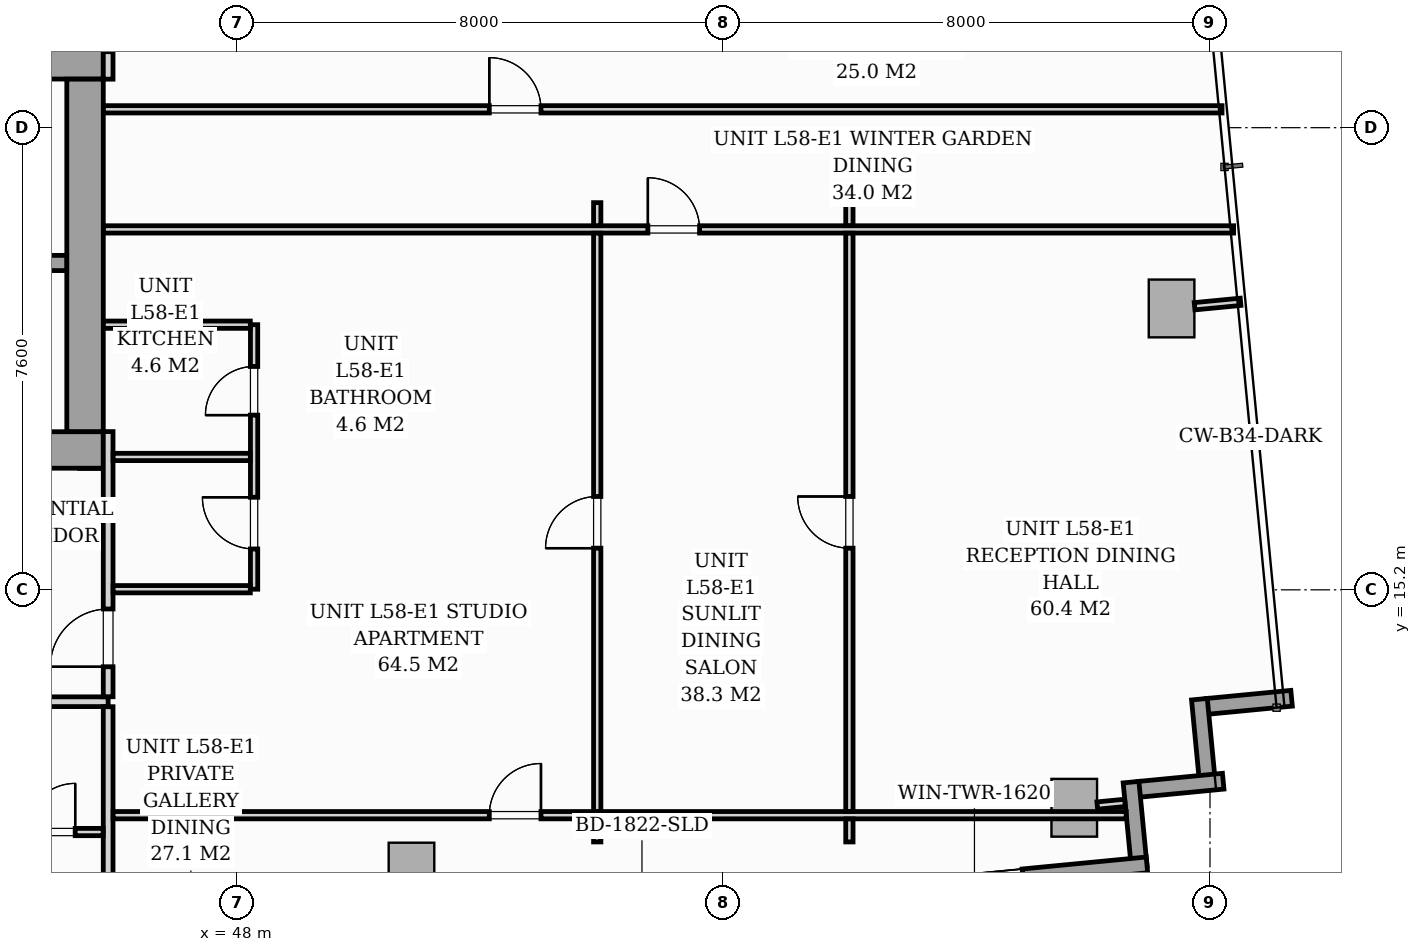
"""IFC4 building model, lengths in metres.
Left out: names, types, materials, properties, quantities, classifications, styles, units other than length and angle.
Written with IfcOpenShell. Run it as: python <this file> out.ifc"""

import sys

from ifc_helpers import new_model, si_unit, direction, frame, frame_2d, origin, origin_2d, place, context, subcontext, project, spatial, rectangle, i_section, extrude, source, transform, mapped, element, fill, save


model = new_model("IFC4")
c1 = context("Model", 3, precision=1e-05, world=origin(), true_north=direction((0.0, 1.0)))
c2 = subcontext(c1, "Body", "Model", "MODEL_VIEW")
j1 = project(units=[si_unit("LENGTHUNIT", "METRE"), si_unit("PLANEANGLEUNIT", "RADIAN")], contexts=[c1])
p1 = place(None, origin())
s1 = spatial("IfcSite", under=j1, at=p1, CompositionType="ELEMENT")
p2 = place(p1, origin())
s2 = spatial("IfcBuilding", under=s1, at=p2, CompositionType="ELEMENT")
p3 = place(p2, frame((0.0, 0.0, 201.8)))
s3 = spatial("IfcBuildingStorey", under=s2, at=p3, CompositionType="ELEMENT", Elevation=201.8)
m1 = source(origin(), c2, "Body", "SweptSolid", [
    extrude(i_section(OverallWidth=0.416, OverallDepth=0.446, WebThickness=0.039, FlangeThickness=0.063, FilletRadius=0.018, at=origin_2d()), origin(), (0.0, 0.0, 1.0), 3.196),
])
for number, where, z_axis, x_axis in (
    (1, (45.6, 17.4, 0.002), (0.0, 0.0, 1.0), (1.0, 0.0, 0.0)),
    (2, (45.6, 24.0, 0.002), (0.0, 0.0, 1.0), (1.0, 0.0, 0.0)),
):
    element("IfcColumn", number, at=place(p3, frame(where, z_axis=z_axis, x_axis=x_axis)), inside=s3, PredefinedType="PILASTER", context=c2, shape_type="MappedRepresentation", body=[
        mapped(m1, transform((0.0, 0.0, 0.0), scale=1.0)),
    ])
m2 = source(origin(), c2, "Body", "SweptSolid", [
    extrude(rectangle(XDim=0.75, YDim=0.95, at=origin_2d()), origin(), (0.0, 0.0, 1.0), 3.196),
])
for number, where, z_axis, x_axis in (
    (3, (50.868, 10.566, 0.002), (0.0, 0.0, 1.0), (0.995, 0.096, 0.0)),
    (4, (61.768, 11.616, 0.002), (0.0, 0.0, 1.0), (0.995, 0.096, 0.0)),
    (5, (63.368, 19.827, 0.002), (0.0, 0.0, 1.0), (0.995, 0.096, 0.0)),
):
    element("IfcColumn", number, at=place(p3, frame(where, z_axis=z_axis, x_axis=x_axis)), inside=s3, PredefinedType="COLUMN", context=c2, shape_type="MappedRepresentation", body=[
        mapped(m2, transform((0.0, 0.0, 0.0), scale=1.0)),
    ])
p4 = place(p3, frame((65.342, 13.417, 0.0), z_axis=(0.0, 0.0, 1.0), x_axis=(-0.99540774648, -0.095725744959, 0.0)))
e6 = element("IfcWall", 6, at=p4, inside=s3, PredefinedType="STANDARD", context=c2, shape_type="SweptSolid", body=[
    extrude(rectangle(XDim=1.395, YDim=0.26, at=frame_2d((0.698, 0.0))), origin(), (0.0, 0.0, 1.0), 2.94),
])
p5 = place(p3, frame((63.826, 13.401, 0.0), z_axis=(0.0, 0.0, 1.0), x_axis=(0.095915846097, -0.995389446633, 0.0)))
e7 = element("IfcWall", 7, at=p5, inside=s3, PredefinedType="STANDARD", context=c2, shape_type="SweptSolid", body=[
    extrude(rectangle(XDim=1.395, YDim=0.26, at=frame_2d((0.697, 0.0))), origin(), (0.0, 0.0, 1.0), 2.94),
])
for number, where, z_axis, x_axis in (
    (8, (64.217, 12.053, 0.0), (0.0, 0.0, 1.0), (-0.995, -0.096, 0.0)),
    (9, (62.702, 12.037, 0.0), (0.0, 0.0, 1.0), (0.096, -0.995, 0.0)),
):
    element("IfcWall", number, at=place(p3, frame(where, z_axis=z_axis, x_axis=x_axis)), inside=s3, PredefinedType="STANDARD", context=c2, shape_type="SweptSolid", body=[
        extrude(rectangle(XDim=1.395, YDim=0.26, at=frame_2d((0.698, 0.0))), origin(), (0.0, 0.0, 1.0), 2.94),
    ])
p6 = place(p3, frame((62.963, 10.676, 0.0), z_axis=(0.0, 0.0, 1.0), x_axis=(-0.995395627913, -0.095851676732, 0.0)))
e10 = element("IfcWall", 10, at=p6, inside=s3, PredefinedType="STANDARD", context=c2, shape_type="SweptSolid", body=[
    extrude(rectangle(XDim=16.1, YDim=0.26, at=frame_2d((8.05, 0.0))), origin(), (0.0, 0.0, 1.0), 2.94),
])
p7 = place(p6, frame((7.443, 0.0, 0.0)))
e11 = element("IfcOpeningElement", 11, at=p7, cuts=e10, PredefinedType="OPENING", context=c2, shape_type="SweptSolid", body=[
    extrude(rectangle(XDim=1.8, YDim=2.06, at=frame_2d((0.9, 1.03))), frame((0.0, 0.14, 0.0), z_axis=(0.0, -1.0, 0.0), x_axis=(1.0, 0.0, 0.0)), (0.0, 0.0, 1.0), 0.28),
])
p8 = place(p6, frame((2.05, 0.0, 0.65)))
e12 = element("IfcOpeningElement", 12, at=p8, cuts=e10, PredefinedType="OPENING", context=c2, shape_type="SweptSolid", body=[
    extrude(rectangle(XDim=1.6, YDim=1.5, at=frame_2d((0.8, 0.75))), frame((0.0, 0.14, 0.0), z_axis=(0.0, -1.0, 0.0), x_axis=(1.0, 0.0, 0.0)), (0.0, 0.0, 1.0), 0.28),
])
p9 = place(p3, frame((26.2, 17.5, 0.0), z_axis=(0.0, 0.0, 1.0), x_axis=(1.0, 0.0, 0.0)))
e13 = element("IfcWall", 13, at=p9, inside=s3, PredefinedType="SHEAR", context=c2, shape_type="SweptSolid", body=[
    extrude(rectangle(XDim=19.6, YDim=0.6, at=frame_2d((9.8, 0.0))), origin(), (0.0, 0.0, 1.0), 3.2),
])
p10 = place(p9, frame((0.95, 0.0, 0.0)))
e14 = element("IfcOpeningElement", 14, at=p10, cuts=e13, PredefinedType="OPENING", context=c2, shape_type="SweptSolid", body=[
    extrude(rectangle(XDim=0.95, YDim=2.06, at=frame_2d((0.475, 1.03))), frame((0.0, 0.31, 0.0), z_axis=(0.0, -1.0, 0.0), x_axis=(1.0, 0.0, 0.0)), (0.0, 0.0, 1.0), 0.62),
])
p11 = place(p9, frame((9.38, 0.0, 0.0)))
e15 = element("IfcOpeningElement", 15, at=p11, cuts=e13, PredefinedType="OPENING", context=c2, shape_type="SweptSolid", body=[
    extrude(rectangle(XDim=0.85, YDim=2.0, at=frame_2d((0.425, 1.0))), frame((0.0, 0.31, 0.0), z_axis=(0.0, -1.0, 0.0), x_axis=(1.0, 0.0, 0.0)), (0.0, 0.0, 1.0), 0.62),
])
p12 = place(p9, frame((17.55, 0.0, 0.0)))
e16 = element("IfcOpeningElement", 16, at=p12, cuts=e13, PredefinedType="OPENING", context=c2, shape_type="SweptSolid", body=[
    extrude(rectangle(XDim=0.95, YDim=2.06, at=frame_2d((0.475, 1.03))), frame((0.0, 0.31, 0.0), z_axis=(0.0, -1.0, 0.0), x_axis=(1.0, 0.0, 0.0)), (0.0, 0.0, 1.0), 0.62),
])
p13 = place(p3, frame((26.2, 23.9, 0.0), z_axis=(0.0, 0.0, 1.0), x_axis=(1.0, 0.0, 0.0)))
e17 = element("IfcWall", 17, at=p13, inside=s3, PredefinedType="SHEAR", context=c2, shape_type="SweptSolid", body=[
    extrude(rectangle(XDim=19.6, YDim=0.6, at=frame_2d((9.8, 0.0))), origin(), (0.0, 0.0, 1.0), 3.2),
])
p14 = place(p3, frame((45.5, 17.802, 0.0), z_axis=(0.0, 0.0, 1.0), x_axis=(0.0, 1.0, 0.0)))
e18 = element("IfcWall", 18, at=p14, inside=s3, PredefinedType="SHEAR", context=c2, shape_type="SweptSolid", body=[
    extrude(rectangle(XDim=5.796, YDim=0.6, at=frame_2d((2.898, 0.0))), origin(), (0.0, 0.0, 1.0), 3.2),
])
p15 = place(p3, frame((37.05, 20.575, 0.0), z_axis=(0.0, 0.0, 1.0), x_axis=(1.0, 0.0, 0.0)))
e19 = element("IfcWall", 19, at=p15, inside=s3, PredefinedType="SOLIDWALL", context=c2, shape_type="SweptSolid", body=[
    extrude(rectangle(XDim=8.148, YDim=0.25, at=frame_2d((4.074, 0.0))), origin(), (0.0, 0.0, 1.0), 3.2),
])
p16 = place(p15, frame((6.6, 0.0, 0.0)))
e20 = element("IfcOpeningElement", 20, at=p16, cuts=e19, PredefinedType="OPENING", context=c2, shape_type="SweptSolid", body=[
    extrude(rectangle(XDim=0.95, YDim=2.06, at=frame_2d((0.475, 1.03))), frame((0.0, 0.135, 0.0), z_axis=(0.0, -1.0, 0.0), x_axis=(1.0, 0.0, 0.0)), (0.0, 0.0, 1.0), 0.27),
])
p17 = place(p3, frame((26.12, 13.36, 0.0), z_axis=(0.0, 0.0, 1.0), x_axis=(1.0, 0.0, 0.0)))
e21 = element("IfcWall", 21, at=p17, inside=s3, PredefinedType="PARTITIONING", context=c2, shape_type="SweptSolid", body=[
    extrude(rectangle(XDim=19.76, YDim=0.16, at=frame_2d((9.88, 0.0))), origin(), (0.0, 0.0, 1.0), 2.94),
])
p18 = place(p17, frame((5.221, 0.0, 0.0)))
e22 = element("IfcOpeningElement", 22, at=p18, cuts=e21, PredefinedType="OPENING", context=c2, shape_type="SweptSolid", body=[
    extrude(rectangle(XDim=0.95, YDim=2.06, at=frame_2d((0.475, 1.03))), frame((0.0, 0.09, 0.0), z_axis=(0.0, -1.0, 0.0), x_axis=(1.0, 0.0, 0.0)), (0.0, 0.0, 1.0), 0.18),
])
p19 = place(p17, frame((12.119, 0.0, 0.0)))
e23 = element("IfcOpeningElement", 23, at=p19, cuts=e21, PredefinedType="OPENING", context=c2, shape_type="SweptSolid", body=[
    extrude(rectangle(XDim=0.95, YDim=2.06, at=frame_2d((0.475, 1.03))), frame((0.0, 0.09, 0.0), z_axis=(0.0, -1.0, 0.0), x_axis=(1.0, 0.0, 0.0)), (0.0, 0.0, 1.0), 0.18),
])
p20 = place(p17, frame((14.492, 0.0, 0.0)))
e24 = element("IfcOpeningElement", 24, at=p20, cuts=e21, PredefinedType="OPENING", context=c2, shape_type="SweptSolid", body=[
    extrude(rectangle(XDim=0.95, YDim=2.06, at=frame_2d((0.475, 1.03))), frame((0.0, 0.09, 0.0), z_axis=(0.0, -1.0, 0.0), x_axis=(1.0, 0.0, 0.0)), (0.0, 0.0, 1.0), 0.18),
])
p21 = place(p3, frame((45.88, 8.981, 0.0), z_axis=(0.0, 0.0, 1.0), x_axis=(0.0, 1.0, 0.0)))
e25 = element("IfcWall", 25, at=p21, inside=s3, PredefinedType="PARTITIONING", context=c2, shape_type="SweptSolid", body=[
    extrude(rectangle(XDim=4.297, YDim=0.16, at=frame_2d((2.148, 0.0))), origin(), (0.0, 0.0, 1.0), 2.94),
])
p22 = place(p3, frame((45.88, 13.442, 0.0), z_axis=(0.0, 0.0, 1.0), x_axis=(0.0, 1.0, 0.0)))
e26 = element("IfcWall", 26, at=p22, inside=s3, PredefinedType="PARTITIONING", context=c2, shape_type="SweptSolid", body=[
    extrude(rectangle(XDim=4.36, YDim=0.16, at=frame_2d((2.18, 0.0))), origin(), (0.0, 0.0, 1.0), 2.94),
])
p23 = place(p22, frame((0.493, 0.0, 0.0)))
e27 = element("IfcOpeningElement", 27, at=p23, cuts=e26, PredefinedType="OPENING", context=c2, shape_type="SweptSolid", body=[
    extrude(rectangle(XDim=0.95, YDim=2.06, at=frame_2d((0.475, 1.03))), frame((0.0, 0.09, 0.0), z_axis=(0.0, -1.0, 0.0), x_axis=(1.0, 0.0, 0.0)), (0.0, 0.0, 1.0), 0.18),
])
p24 = place(p3, frame((45.88, 23.598, 0.0), z_axis=(0.0, 0.0, 1.0), x_axis=(0.0, 1.0, 0.0)))
e28 = element("IfcWall", 28, at=p24, inside=s3, PredefinedType="PARTITIONING", context=c2, shape_type="SweptSolid", body=[
    extrude(rectangle(XDim=0.452, YDim=0.16, at=frame_2d((0.226, 0.0))), origin(), (0.0, 0.0, 1.0), 2.94),
])
p25 = place(p3, frame((42.122, 11.217, 0.0), z_axis=(0.0, 0.0, 1.0), x_axis=(1.0, 0.0, 0.0)))
e29 = element("IfcWall", 29, at=p25, inside=s3, PredefinedType="PARTITIONING", context=c2, shape_type="SweptSolid", body=[
    extrude(rectangle(XDim=3.676, YDim=0.12, at=frame_2d((1.838, 0.0))), origin(), (0.0, 0.0, 1.0), 2.94),
])
p26 = place(p25, frame((0.552, 0.0, 0.0)))
e30 = element("IfcOpeningElement", 30, at=p26, cuts=e29, PredefinedType="OPENING", context=c2, shape_type="SweptSolid", body=[
    extrude(rectangle(XDim=0.85, YDim=2.05, at=frame_2d((0.425, 1.025))), frame((0.0, 0.07, 0.0), z_axis=(0.0, -1.0, 0.0), x_axis=(1.0, 0.0, 0.0)), (0.0, 0.0, 1.0), 0.14),
])
p27 = place(p25, frame((2.416, 0.0, 0.0)))
e31 = element("IfcOpeningElement", 31, at=p27, cuts=e29, PredefinedType="OPENING", context=c2, shape_type="SweptSolid", body=[
    extrude(rectangle(XDim=0.8, YDim=2.02, at=frame_2d((0.4, 1.01))), frame((0.0, 0.07, 0.0), z_axis=(0.0, -1.0, 0.0), x_axis=(1.0, 0.0, 0.0)), (0.0, 0.0, 1.0), 0.14),
])
p28 = place(p3, frame((48.28, 15.21, 0.0), z_axis=(0.0, 0.0, 1.0), x_axis=(0.0, 1.0, 0.0)))
e32 = element("IfcWall", 32, at=p28, inside=s3, PredefinedType="PARTITIONING", context=c2, shape_type="SweptSolid", body=[
    extrude(rectangle(XDim=4.35, YDim=0.12, at=frame_2d((2.175, 0.0))), origin(), (0.0, 0.0, 1.0), 2.94),
])
p29 = place(p28, frame((0.662, 0.0, 0.0)))
e33 = element("IfcOpeningElement", 33, at=p29, cuts=e32, PredefinedType="OPENING", context=c2, shape_type="SweptSolid", body=[
    extrude(rectangle(XDim=0.85, YDim=2.05, at=frame_2d((0.425, 1.025))), frame((0.0, 0.07, 0.0), z_axis=(0.0, -1.0, 0.0), x_axis=(1.0, 0.0, 0.0)), (0.0, 0.0, 1.0), 0.14),
])
p30 = place(p28, frame((2.863, 0.0, 0.0)))
e34 = element("IfcOpeningElement", 34, at=p30, cuts=e32, PredefinedType="OPENING", context=c2, shape_type="SweptSolid", body=[
    extrude(rectangle(XDim=0.8, YDim=2.02, at=frame_2d((0.4, 1.01))), frame((0.0, 0.07, 0.0), z_axis=(0.0, -1.0, 0.0), x_axis=(1.0, 0.0, 0.0)), (0.0, 0.0, 1.0), 0.14),
])
p31 = place(p3, frame((45.962, 17.385, 0.0), z_axis=(0.0, 0.0, 1.0), x_axis=(1.0, 0.0, 0.0)))
e35 = element("IfcWall", 35, at=p31, inside=s3, PredefinedType="PARTITIONING", context=c2, shape_type="SweptSolid", body=[
    extrude(rectangle(XDim=2.256, YDim=0.12, at=frame_2d((1.128, 0.0))), origin(), (0.0, 0.0, 1.0), 2.281),
])
p32 = place(p3, frame((45.962, 15.21, 0.0), z_axis=(0.0, 0.0, 1.0), x_axis=(1.0, 0.0, 0.0)))
e36 = element("IfcWall", 36, at=p32, inside=s3, PredefinedType="PARTITIONING", context=c2, shape_type="SweptSolid", body=[
    extrude(rectangle(XDim=2.256, YDim=0.12, at=frame_2d((1.128, 0.0))), origin(), (0.0, 0.0, 1.0), 2.94),
])
p33 = place(p3, frame((45.802, 19.56, 0.0), z_axis=(0.0, 0.0, 1.0), x_axis=(1.0, 0.0, 0.0)))
e37 = element("IfcWall", 37, at=p33, inside=s3, PredefinedType="PARTITIONING", context=c2, shape_type="SweptSolid", body=[
    extrude(rectangle(XDim=2.416, YDim=0.12, at=frame_2d((1.208, 0.0))), origin(), (0.0, 0.0, 1.0), 2.94),
])
p34 = place(p3, frame((45.802, 23.102, 0.0), z_axis=(0.0, 0.0, 1.0), x_axis=(1.0, 0.0, 0.0)))
e38 = element("IfcWall", 38, at=p34, inside=s3, PredefinedType="PARTITIONING", context=c2, shape_type="SweptSolid", body=[
    extrude(rectangle(XDim=18.396, YDim=0.12, at=frame_2d((9.198, 0.0))), origin(), (0.0, 0.0, 1.0), 2.94),
])
p35 = place(p34, frame((6.346, 0.0, 0.0)))
e39 = element("IfcOpeningElement", 39, at=p35, cuts=e38, PredefinedType="OPENING", context=c2, shape_type="SweptSolid", body=[
    extrude(rectangle(XDim=0.85, YDim=2.05, at=frame_2d((0.425, 1.025))), frame((0.0, 0.07, 0.0), z_axis=(0.0, -1.0, 0.0), x_axis=(1.0, 0.0, 0.0)), (0.0, 0.0, 1.0), 0.14),
])
p36 = place(p3, frame((45.962, 11.494, 0.0), z_axis=(0.0, 0.0, 1.0), x_axis=(1.0, 0.0, 0.0)))
e40 = element("IfcWall", 40, at=p36, inside=s3, PredefinedType="PARTITIONING", context=c2, shape_type="SweptSolid", body=[
    extrude(rectangle(XDim=16.66, YDim=0.12, at=frame_2d((8.33, 0.0))), origin(), (0.0, 0.0, 1.0), 2.383),
])
p37 = place(p36, frame((6.186, 0.0, 0.0)))
e41 = element("IfcOpeningElement", 41, at=p37, cuts=e40, PredefinedType="OPENING", context=c2, shape_type="SweptSolid", body=[
    extrude(rectangle(XDim=0.85, YDim=2.05, at=frame_2d((0.425, 1.025))), frame((0.0, 0.07, 0.0), z_axis=(0.0, -1.0, 0.0), x_axis=(1.0, 0.0, 0.0)), (0.0, 0.0, 1.0), 0.14),
])
p38 = place(p3, frame((45.802, 21.127, 0.0), z_axis=(0.0, 0.0, 1.0), x_axis=(1.0, 0.0, 0.0)))
e42 = element("IfcWall", 42, at=p38, inside=s3, PredefinedType="PARTITIONING", context=c2, shape_type="SweptSolid", body=[
    extrude(rectangle(XDim=18.586, YDim=0.12, at=frame_2d((9.293, 0.0))), origin(), (0.0, 0.0, 1.0), 2.94),
])
p39 = place(p38, frame((8.954, 0.0, 0.0)))
e43 = element("IfcOpeningElement", 43, at=p39, cuts=e42, PredefinedType="OPENING", context=c2, shape_type="SweptSolid", body=[
    extrude(rectangle(XDim=0.85, YDim=2.05, at=frame_2d((0.425, 1.025))), frame((0.0, 0.07, 0.0), z_axis=(0.0, -1.0, 0.0), x_axis=(1.0, 0.0, 0.0)), (0.0, 0.0, 1.0), 0.14),
])
p40 = place(p3, frame((58.07, 11.054, 0.0), z_axis=(0.0, 0.0, 1.0), x_axis=(0.0, 1.0, 0.0)))
e44 = element("IfcWall", 44, at=p40, inside=s3, PredefinedType="PARTITIONING", context=c2, shape_type="SweptSolid", body=[
    extrude(rectangle(XDim=0.378, YDim=0.12, at=frame_2d((0.189, 0.0))), origin(), (0.0, 0.0, 1.0), 2.94),
])
p41 = place(p3, frame((58.07, 11.556, 0.0), z_axis=(0.0, 0.0, 1.0), x_axis=(0.0, 1.0, 0.0)))
e45 = element("IfcWall", 45, at=p41, inside=s3, PredefinedType="PARTITIONING", context=c2, shape_type="SweptSolid", body=[
    extrude(rectangle(XDim=9.509, YDim=0.12, at=frame_2d((4.754, 0.0))), origin(), (0.0, 0.0, 1.0), 2.94),
])
p42 = place(p41, frame((4.329, 0.0, 0.0)))
e46 = element("IfcOpeningElement", 46, at=p42, cuts=e45, PredefinedType="OPENING", context=c2, shape_type="SweptSolid", body=[
    extrude(rectangle(XDim=0.85, YDim=2.05, at=frame_2d((0.425, 1.025))), frame((0.0, 0.07, 0.0), z_axis=(0.0, -1.0, 0.0), x_axis=(1.0, 0.0, 0.0)), (0.0, 0.0, 1.0), 0.14),
])
for number, where, z_axis, x_axis in (
    (47, (58.07, 21.189, 0.0), (0.0, 0.0, 1.0), (0.0, 1.0, 0.0)),
    (48, (53.923, 11.054, 0.0), (0.0, 0.0, 1.0), (0.0, 1.0, 0.0)),
):
    element("IfcWall", number, at=place(p3, frame(where, z_axis=z_axis, x_axis=x_axis)), inside=s3, PredefinedType="PARTITIONING", context=c2, shape_type="SweptSolid", body=[
        extrude(rectangle(XDim=0.378, YDim=0.12, at=frame_2d((0.189, 0.0))), origin(), (0.0, 0.0, 1.0), 2.94),
    ])
p43 = place(p3, frame((53.923, 11.556, 0.0), z_axis=(0.0, 0.0, 1.0), x_axis=(0.0, 1.0, 0.0)))
e49 = element("IfcWall", 49, at=p43, inside=s3, PredefinedType="PARTITIONING", context=c2, shape_type="SweptSolid", body=[
    extrude(rectangle(XDim=9.509, YDim=0.12, at=frame_2d((4.754, 0.0))), origin(), (0.0, 0.0, 1.0), 2.94),
])
p44 = place(p43, frame((4.329, 0.0, 0.0)))
e50 = element("IfcOpeningElement", 50, at=p44, cuts=e49, PredefinedType="OPENING", context=c2, shape_type="SweptSolid", body=[
    extrude(rectangle(XDim=0.85, YDim=2.05, at=frame_2d((0.425, 1.025))), frame((0.0, 0.07, 0.0), z_axis=(0.0, -1.0, 0.0), x_axis=(1.0, 0.0, 0.0)), (0.0, 0.0, 1.0), 0.14),
])
p45 = place(p3, frame((53.923, 21.189, 0.0), z_axis=(0.0, 0.0, 1.0), x_axis=(0.0, 1.0, 0.0)))
e51 = element("IfcWall", 51, at=p45, inside=s3, PredefinedType="PARTITIONING", context=c2, shape_type="SweptSolid", body=[
    extrude(rectangle(XDim=0.378, YDim=0.12, at=frame_2d((0.189, 0.0))), origin(), (0.0, 0.0, 1.0), 2.94),
])
p46 = place(p3, frame((62.146, 11.652, 0.0), z_axis=(0.0, 0.0, 1.0), x_axis=(0.995384576284, 0.09596637586, 0.0)))
e52 = element("IfcWall", 52, at=p46, inside=s3, PredefinedType="PARTITIONING", context=c2, shape_type="SweptSolid", body=[
    extrude(rectangle(XDim=0.458, YDim=0.12, at=frame_2d((0.229, 0.0))), origin(), (0.0, 0.0, 1.0), 2.94),
])
p47 = place(p3, frame((63.747, 19.864, 0.0), z_axis=(0.0, 0.0, 1.0), x_axis=(0.995405496295, 0.095749140702, 0.0)))
e53 = element("IfcWall", 53, at=p47, inside=s3, PredefinedType="PARTITIONING", context=c2, shape_type="SweptSolid", body=[
    extrude(rectangle(XDim=0.76, YDim=0.12, at=frame_2d((0.38, 0.0))), origin(), (0.0, 0.0, 1.0), 2.94),
])
m3 = source(origin(), c2, "Body", "SweptSolid", [
    extrude(rectangle(XDim=0.8, YDim=2.02, at=frame_2d((0.4, 1.01))), frame((0.0, 0.025, 0.0), z_axis=(0.0, -1.0, 0.0), x_axis=(1.0, 0.0, 0.0)), (0.0, 0.0, 1.0), 0.05),
])
p48 = place(p27, origin())
e54 = element("IfcDoor", 54, at=p48, inside=s3, OperationType="SINGLE_SWING_RIGHT", PredefinedType="DOOR", context=c2, shape_type="MappedRepresentation", body=[
    mapped(m3, transform((0.0, 0.0, 0.0), scale=1.0)),
])
fill(e31, e54)
m4 = source(origin(), c2, "Body", "SweptSolid", [
    extrude(rectangle(XDim=0.95, YDim=2.06, at=frame_2d((0.475, 1.03))), frame((0.0, 0.025, 0.0), z_axis=(0.0, -1.0, 0.0), x_axis=(1.0, 0.0, 0.0)), (0.0, 0.0, 1.0), 0.05),
])
p49 = place(p23, origin())
e55 = element("IfcDoor", 55, at=p49, inside=s3, OperationType="SINGLE_SWING_LEFT", PredefinedType="DOOR", context=c2, shape_type="MappedRepresentation", body=[
    mapped(m4, transform((0.0, 0.0, 0.0), scale=1.0)),
])
fill(e27, e55)
m5 = source(origin(), c2, "Body", "SweptSolid", [
    extrude(rectangle(XDim=0.85, YDim=2.05, at=frame_2d((0.425, 1.025))), frame((0.0, 0.025, 0.0), z_axis=(0.0, -1.0, 0.0), x_axis=(1.0, 0.0, 0.0)), (0.0, 0.0, 1.0), 0.05),
])
p50 = place(p29, origin())
e56 = element("IfcDoor", 56, at=p50, inside=s3, OperationType="SINGLE_SWING_RIGHT", PredefinedType="DOOR", context=c2, shape_type="MappedRepresentation", body=[
    mapped(m5, transform((0.0, 0.0, 0.0), scale=1.0)),
])
fill(e33, e56)
p51 = place(p30, origin())
e57 = element("IfcDoor", 57, at=p51, inside=s3, OperationType="SINGLE_SWING_LEFT", PredefinedType="DOOR", context=c2, shape_type="MappedRepresentation", body=[
    mapped(m3, transform((0.0, 0.0, 0.0), scale=1.0)),
])
fill(e34, e57)
p52 = place(p35, origin())
e58 = element("IfcDoor", 58, at=p52, inside=s3, OperationType="SINGLE_SWING_LEFT", PredefinedType="DOOR", context=c2, shape_type="MappedRepresentation", body=[
    mapped(m5, transform((0.0, 0.0, 0.0), scale=1.0)),
])
fill(e39, e58)
p53 = place(p37, origin())
e59 = element("IfcDoor", 59, at=p53, inside=s3, OperationType="SINGLE_SWING_RIGHT", PredefinedType="DOOR", context=c2, shape_type="MappedRepresentation", body=[
    mapped(m5, transform((0.0, 0.0, 0.0), scale=1.0)),
])
fill(e41, e59)
p54 = place(p39, origin())
e60 = element("IfcDoor", 60, at=p54, inside=s3, OperationType="SINGLE_SWING_LEFT", PredefinedType="DOOR", context=c2, shape_type="MappedRepresentation", body=[
    mapped(m5, transform((0.0, 0.0, 0.0), scale=1.0)),
])
fill(e43, e60)
p55 = place(p42, origin())
e61 = element("IfcDoor", 61, at=p55, inside=s3, OperationType="SINGLE_SWING_RIGHT", PredefinedType="DOOR", context=c2, shape_type="MappedRepresentation", body=[
    mapped(m5, transform((0.0, 0.0, 0.0), scale=1.0)),
])
fill(e46, e61)
p56 = place(p44, origin())
e62 = element("IfcDoor", 62, at=p56, inside=s3, OperationType="SINGLE_SWING_LEFT", PredefinedType="DOOR", context=c2, shape_type="MappedRepresentation", body=[
    mapped(m5, transform((0.0, 0.0, 0.0), scale=1.0)),
])
fill(e50, e62)
save(model, sys.argv[1])
